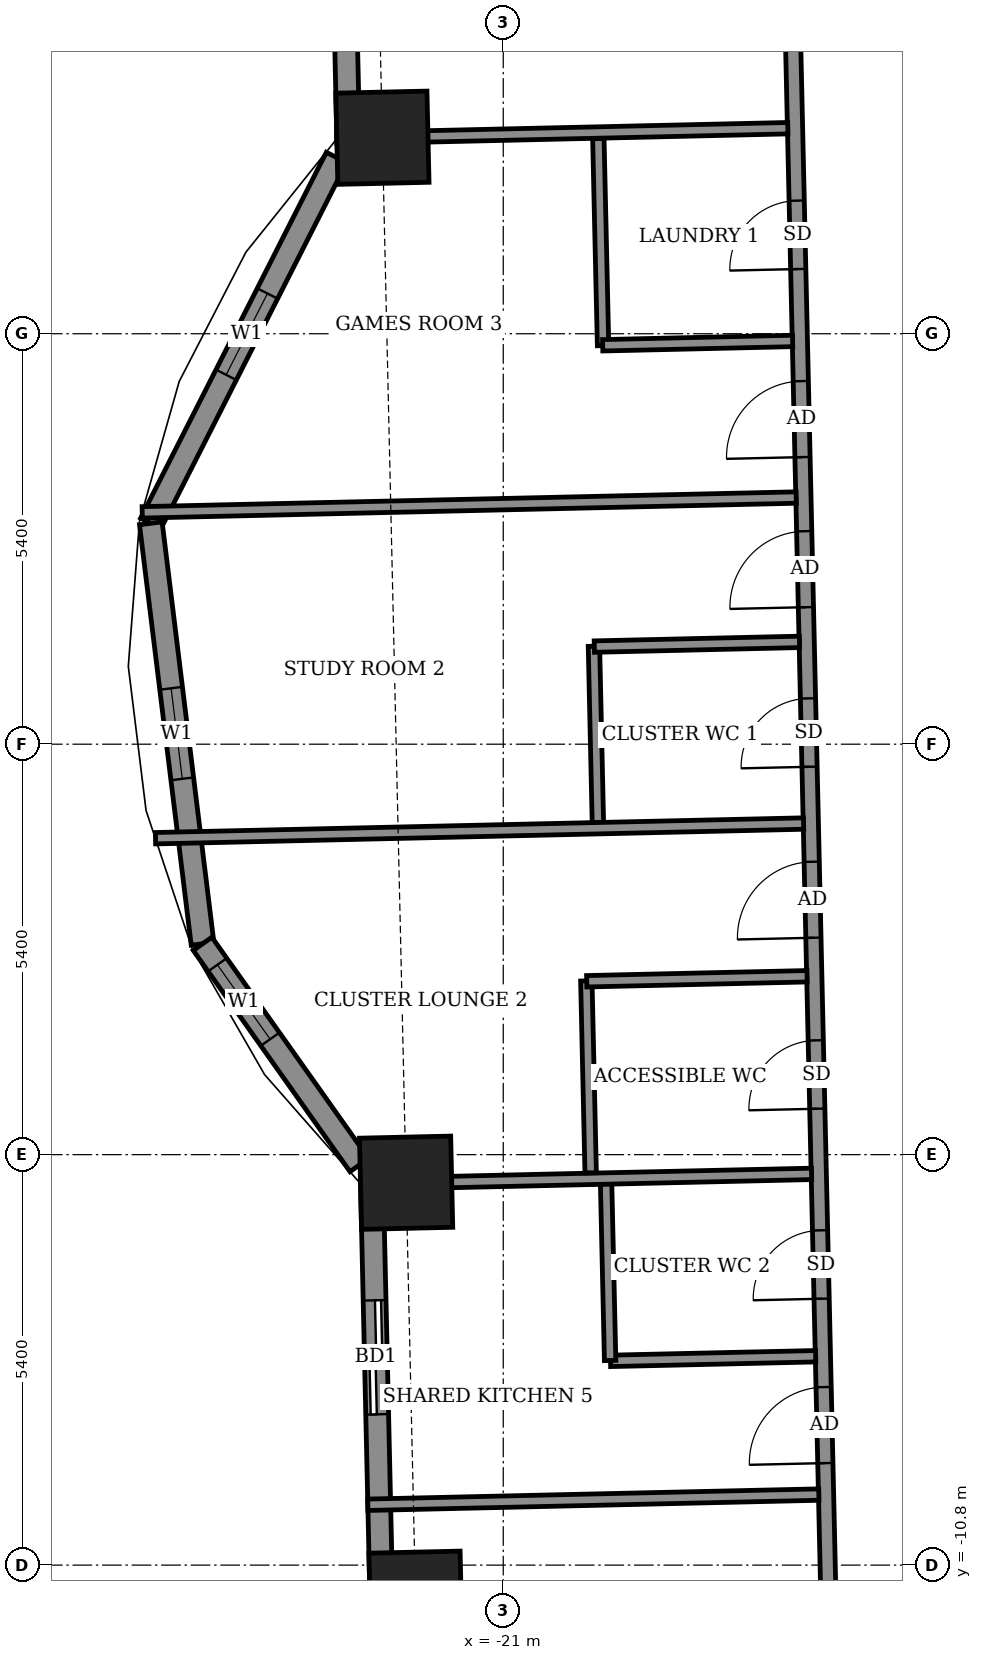
"""IFC4 building model, lengths in metres.
Left out: names, types, materials, properties, quantities, classifications, styles, units other than length and angle.
Written with IfcOpenShell. Run it as: python <this file> out.ifc"""

import sys

from ifc_helpers import new_model, si_unit, direction, frame, frame_2d, origin, origin_2d, place, context, subcontext, project, spatial, rectangle, extrude, element, fill, save


model = new_model("IFC4")
c1 = context("Model", 3, precision=1e-05, world=origin(), true_north=direction((0.0, 1.0)))
c2 = subcontext(c1, "Body", "Model", "MODEL_VIEW")
j1 = project(units=[si_unit("LENGTHUNIT", "METRE"), si_unit("PLANEANGLEUNIT", "RADIAN")], contexts=[c1])
p1 = place(None, origin())
s1 = spatial("IfcSite", under=j1, at=p1, CompositionType="ELEMENT")
p2 = place(p1, origin())
s2 = spatial("IfcBuilding", under=s1, at=p2, CompositionType="ELEMENT")
p3 = place(p2, frame((0.0, 0.0, 186.1)))
s3 = spatial("IfcBuildingStorey", under=s2, at=p3, CompositionType="ELEMENT", Elevation=186.1)
for number, where, z_axis, x_axis in (
    (1, (-22.278, -5.769, -0.55), (0.0, 0.0, 1.0), (0.023, -1.0, 0.0)),
    (2, (-22.154, -11.229, -0.55), (0.0, 0.0, 1.0), (0.023, -1.0, 0.0)),
    (3, (-22.59, 7.979, -0.55), (0.0, 0.0, 1.0), (0.023, -1.0, 0.0)),
):
    element("IfcColumn", number, at=place(p3, frame(where, z_axis=z_axis, x_axis=x_axis)), inside=s3, PredefinedType="COLUMN", context=c2, shape_type="SweptSolid", body=[
        extrude(rectangle(XDim=1.2, YDim=1.2, at=origin_2d()), origin(), (0.0, 0.0, 1.0), 3.6),
    ])
p4 = place(p3, frame((-23.275, 18.34, 0.0), z_axis=(0.0, 0.0, 1.0), x_axis=(0.022705985163, -0.999742185885, 0.0)))
e4 = element("IfcWall", 4, at=p4, inside=s3, PredefinedType="SOLIDWALL", context=c2, shape_type="SweptSolid", body=[
    extrude(rectangle(XDim=10.43, YDim=0.3, at=frame_2d((5.215, 0.0))), origin(), (0.0, 0.0, 1.0), 3.05),
])
p5 = place(p4, frame((1.359, 0.0, 0.0)))
e5 = element("IfcOpeningElement", 5, at=p5, cuts=e4, PredefinedType="OPENING", context=c2, shape_type="SweptSolid", body=[
    extrude(rectangle(XDim=1.5, YDim=2.4, at=frame_2d((0.75, 1.2))), frame((0.0, 0.16, 0.0), z_axis=(0.0, -1.0, 0.0), x_axis=(1.0, 0.0, 0.0)), (0.0, 0.0, 1.0), 0.32),
])
p6 = place(p4, frame((6.543, 0.0, 0.9)))
e6 = element("IfcOpeningElement", 6, at=p6, cuts=e4, PredefinedType="OPENING", context=c2, shape_type="SweptSolid", body=[
    extrude(rectangle(XDim=2.4, YDim=1.5, at=frame_2d((1.2, 0.75))), frame((0.0, 0.16, 0.0), z_axis=(0.0, -1.0, 0.0), x_axis=(1.0, 0.0, 0.0)), (0.0, 0.0, 1.0), 0.32),
])
p7 = place(p3, frame((-23.194, 7.719, 0.0), z_axis=(0.0, 0.0, 1.0), x_axis=(-0.452597193435, -0.891715078091, 0.0)))
e7 = element("IfcWall", 7, at=p7, inside=s3, PredefinedType="SOLIDWALL", context=c2, shape_type="SweptSolid", body=[
    extrude(rectangle(XDim=5.397, YDim=0.3, at=frame_2d((2.699, 0.0))), origin(), (0.0, 0.0, 1.0), 3.05),
])
p8 = place(p7, frame((2.007, 0.0, 0.9)))
e8 = element("IfcOpeningElement", 8, at=p8, cuts=e7, PredefinedType="OPENING", context=c2, shape_type="SweptSolid", body=[
    extrude(rectangle(XDim=1.2, YDim=1.5, at=frame_2d((0.6, 0.75))), frame((0.0, 0.16, 0.0), z_axis=(0.0, -1.0, 0.0), x_axis=(1.0, 0.0, 0.0)), (0.0, 0.0, 1.0), 0.32),
])
p9 = place(p3, frame((-25.637, 2.906, 0.0), z_axis=(0.0, 0.0, 1.0), x_axis=(0.122163831021, -0.992509948761, 0.0)))
e9 = element("IfcWall", 9, at=p9, inside=s3, PredefinedType="SOLIDWALL", context=c2, shape_type="SweptSolid", body=[
    extrude(rectangle(XDim=5.574, YDim=0.3, at=frame_2d((2.787, 0.0))), origin(), (0.0, 0.0, 1.0), 3.05),
])
p10 = place(p9, frame((2.187, 0.0, 0.9)))
e10 = element("IfcOpeningElement", 10, at=p10, cuts=e9, PredefinedType="OPENING", context=c2, shape_type="SweptSolid", body=[
    extrude(rectangle(XDim=1.2, YDim=1.5, at=frame_2d((0.6, 0.75))), frame((0.0, 0.16, 0.0), z_axis=(0.0, -1.0, 0.0), x_axis=(1.0, 0.0, 0.0)), (0.0, 0.0, 1.0), 0.32),
])
p11 = place(p3, frame((-24.956, -2.626, 0.0), z_axis=(0.0, 0.0, 1.0), x_axis=(0.578009745555, -0.816029861, 0.0)))
e11 = element("IfcWall", 11, at=p11, inside=s3, PredefinedType="SOLIDWALL", context=c2, shape_type="SweptSolid", body=[
    extrude(rectangle(XDim=3.567, YDim=0.3, at=frame_2d((1.784, 0.0))), origin(), (0.0, 0.0, 1.0), 3.05),
])
p12 = place(p11, frame((0.338, 0.0, 0.9)))
e12 = element("IfcOpeningElement", 12, at=p12, cuts=e11, PredefinedType="OPENING", context=c2, shape_type="SweptSolid", body=[
    extrude(rectangle(XDim=1.2, YDim=1.5, at=frame_2d((0.6, 0.75))), frame((0.0, 0.16, 0.0), z_axis=(0.0, -1.0, 0.0), x_axis=(1.0, 0.0, 0.0)), (0.0, 0.0, 1.0), 0.32),
])
p13 = place(p3, frame((-22.729, -5.725, 0.0), z_axis=(0.0, 0.0, 1.0), x_axis=(0.022726014582, -0.999741730779, 0.0)))
e13 = element("IfcWall", 13, at=p13, inside=s3, PredefinedType="SOLIDWALL", context=c2, shape_type="SweptSolid", body=[
    extrude(rectangle(XDim=10.829, YDim=0.3, at=frame_2d((5.414, 0.0))), origin(), (0.0, 0.0, 1.0), 3.05),
])
p14 = place(p13, frame((1.592, 0.0, 0.0)))
e14 = element("IfcOpeningElement", 14, at=p14, cuts=e13, PredefinedType="OPENING", context=c2, shape_type="SweptSolid", body=[
    extrude(rectangle(XDim=1.5, YDim=2.4, at=frame_2d((0.75, 1.2))), frame((0.0, 0.16, 0.0), z_axis=(0.0, -1.0, 0.0), x_axis=(1.0, 0.0, 0.0)), (0.0, 0.0, 1.0), 0.32),
])
p15 = place(p13, frame((8.05, 0.0, 0.9)))
e15 = element("IfcOpeningElement", 15, at=p15, cuts=e13, PredefinedType="OPENING", context=c2, shape_type="SweptSolid", body=[
    extrude(rectangle(XDim=1.2, YDim=1.5, at=frame_2d((0.6, 0.75))), frame((0.0, 0.16, 0.0), z_axis=(0.0, -1.0, 0.0), x_axis=(1.0, 0.0, 0.0)), (0.0, 0.0, 1.0), 0.32),
])
p16 = place(p3, frame((-25.421, -8.966, 0.0), z_axis=(0.0, 0.0, 1.0), x_axis=(-0.022675106248, 0.999742886725, 0.0)))
e16 = element("IfcWall", 16, at=p16, inside=s3, PredefinedType="USERDEFINED", context=c2, shape_type="SweptSolid", body=[
    extrude(rectangle(XDim=2.875, YDim=0.55, at=frame_2d((1.438, 0.0))), origin(), (0.0, 0.0, 1.0), 0.8),
])
p17 = place(p3, frame((-16.684, -12.919, 0.0), z_axis=(0.0, 0.0, 1.0), x_axis=(-0.022694293906, 0.999742451346, 0.0)))
e17 = element("IfcWall", 17, at=p17, inside=s3, PredefinedType="PARTITIONING", context=c2, shape_type="SweptSolid", body=[
    extrude(rectangle(XDim=28.024, YDim=0.2, at=frame_2d((14.012, 0.0))), origin(), (0.0, 0.0, 1.0), 3.05),
])
p18 = place(p17, frame((22.825, 0.0, 0.0)))
e18 = element("IfcOpeningElement", 18, at=p18, cuts=e17, PredefinedType="OPENING", context=c2, shape_type="SweptSolid", body=[
    extrude(rectangle(XDim=1.0, YDim=2.1, at=frame_2d((0.5, 1.05))), frame((0.0, 0.11, 0.0), z_axis=(0.0, -1.0, 0.0), x_axis=(1.0, 0.0, 0.0)), (0.0, 0.0, 1.0), 0.22),
])
p19 = place(p17, frame((26.374, 0.0, 0.0)))
e19 = element("IfcOpeningElement", 19, at=p19, cuts=e17, PredefinedType="OPENING", context=c2, shape_type="SweptSolid", body=[
    extrude(rectangle(XDim=0.9, YDim=2.1, at=frame_2d((0.45, 1.05))), frame((0.0, 0.11, 0.0), z_axis=(0.0, -1.0, 0.0), x_axis=(1.0, 0.0, 0.0)), (0.0, 0.0, 1.0), 0.22),
])
p20 = place(p17, frame((16.7, 0.0, 0.0)))
e20 = element("IfcOpeningElement", 20, at=p20, cuts=e17, PredefinedType="OPENING", context=c2, shape_type="SweptSolid", body=[
    extrude(rectangle(XDim=1.0, YDim=2.1, at=frame_2d((0.5, 1.05))), frame((0.0, 0.11, 0.0), z_axis=(0.0, -1.0, 0.0), x_axis=(1.0, 0.0, 0.0)), (0.0, 0.0, 1.0), 0.22),
])
p21 = place(p17, frame((19.175, 0.0, 0.0)))
e21 = element("IfcOpeningElement", 21, at=p21, cuts=e17, PredefinedType="OPENING", context=c2, shape_type="SweptSolid", body=[
    extrude(rectangle(XDim=0.9, YDim=2.1, at=frame_2d((0.45, 1.05))), frame((0.0, 0.11, 0.0), z_axis=(0.0, -1.0, 0.0), x_axis=(1.0, 0.0, 0.0)), (0.0, 0.0, 1.0), 0.22),
])
p22 = place(p17, frame((14.725, 0.0, 0.0)))
e22 = element("IfcOpeningElement", 22, at=p22, cuts=e17, PredefinedType="OPENING", context=c2, shape_type="SweptSolid", body=[
    extrude(rectangle(XDim=1.0, YDim=2.1, at=frame_2d((0.5, 1.05))), frame((0.0, 0.11, 0.0), z_axis=(0.0, -1.0, 0.0), x_axis=(1.0, 0.0, 0.0)), (0.0, 0.0, 1.0), 0.22),
])
p23 = place(p17, frame((12.625, 0.0, 0.0)))
e23 = element("IfcOpeningElement", 23, at=p23, cuts=e17, PredefinedType="OPENING", context=c2, shape_type="SweptSolid", body=[
    extrude(rectangle(XDim=0.9, YDim=2.1, at=frame_2d((0.45, 1.05))), frame((0.0, 0.11, 0.0), z_axis=(0.0, -1.0, 0.0), x_axis=(1.0, 0.0, 0.0)), (0.0, 0.0, 1.0), 0.22),
])
p24 = place(p17, frame((10.375, 0.0, 0.0)))
e24 = element("IfcOpeningElement", 24, at=p24, cuts=e17, PredefinedType="OPENING", context=c2, shape_type="SweptSolid", body=[
    extrude(rectangle(XDim=1.0, YDim=2.1, at=frame_2d((0.5, 1.05))), frame((0.0, 0.11, 0.0), z_axis=(0.0, -1.0, 0.0), x_axis=(1.0, 0.0, 0.0)), (0.0, 0.0, 1.0), 0.22),
])
p25 = place(p17, frame((8.125, 0.0, 0.0)))
e25 = element("IfcOpeningElement", 25, at=p25, cuts=e17, PredefinedType="OPENING", context=c2, shape_type="SweptSolid", body=[
    extrude(rectangle(XDim=0.9, YDim=2.1, at=frame_2d((0.45, 1.05))), frame((0.0, 0.11, 0.0), z_axis=(0.0, -1.0, 0.0), x_axis=(1.0, 0.0, 0.0)), (0.0, 0.0, 1.0), 0.22),
])
p26 = place(p17, frame((3.462, 0.0, 0.0)))
e26 = element("IfcOpeningElement", 26, at=p26, cuts=e17, PredefinedType="OPENING", context=c2, shape_type="SweptSolid", body=[
    extrude(rectangle(XDim=1.0, YDim=2.1, at=frame_2d((0.5, 1.05))), frame((0.0, 0.11, 0.0), z_axis=(0.0, -1.0, 0.0), x_axis=(1.0, 0.0, 0.0)), (0.0, 0.0, 1.0), 0.22),
])
p27 = place(p17, frame((5.625, 0.0, 0.0)))
e27 = element("IfcOpeningElement", 27, at=p27, cuts=e17, PredefinedType="OPENING", context=c2, shape_type="SweptSolid", body=[
    extrude(rectangle(XDim=0.9, YDim=2.1, at=frame_2d((0.45, 1.05))), frame((0.0, 0.11, 0.0), z_axis=(0.0, -1.0, 0.0), x_axis=(1.0, 0.0, 0.0)), (0.0, 0.0, 1.0), 0.22),
])
p28 = place(p3, frame((-22.782, -10.006, 0.0), z_axis=(0.0, 0.0, 1.0), x_axis=(0.999745010927, 0.02258125611, 0.0)))
e28 = element("IfcWall", 28, at=p28, inside=s3, PredefinedType="PARTITIONING", context=c2, shape_type="SweptSolid", body=[
    extrude(rectangle(XDim=5.936, YDim=0.15, at=frame_2d((2.968, 0.0))), origin(), (0.0, 0.0, 1.0), 2.55),
])
p29 = place(p3, frame((-19.589, -8.113, 0.0), z_axis=(0.0, 0.0, 1.0), x_axis=(0.999744443191, 0.022606377605, 0.0)))
e29 = element("IfcWall", 29, at=p29, inside=s3, PredefinedType="PARTITIONING", context=c2, shape_type="SweptSolid", body=[
    extrude(rectangle(XDim=2.7, YDim=0.15, at=frame_2d((1.35, 0.0))), origin(), (0.0, 0.0, 1.0), 3.05),
])
p30 = place(p3, frame((-19.594, -8.108, 0.0), z_axis=(0.0, 0.0, 1.0), x_axis=(-0.02279059109, 0.999740260747, 0.0)))
e30 = element("IfcWall", 30, at=p30, inside=s3, PredefinedType="PARTITIONING", context=c2, shape_type="SweptSolid", body=[
    extrude(rectangle(XDim=2.324, YDim=0.15, at=frame_2d((1.162, 0.0))), origin(), (0.0, 0.0, 1.0), 3.05),
])
p31 = place(p3, frame((-22.578, -5.78, 0.0), z_axis=(0.0, 0.0, 1.0), x_axis=(0.999746200787, 0.022528515532, 0.0)))
e31 = element("IfcWall", 31, at=p31, inside=s3, PredefinedType="PARTITIONING", context=c2, shape_type="SweptSolid", body=[
    extrude(rectangle(XDim=5.635, YDim=0.15, at=frame_2d((2.818, 0.0))), origin(), (0.0, 0.0, 1.0), 3.05),
])
p32 = place(p3, frame((-19.85, -5.639, 0.0), z_axis=(0.0, 0.0, 1.0), x_axis=(-0.022523775833, 0.999746307581, 0.0)))
e32 = element("IfcWall", 32, at=p32, inside=s3, PredefinedType="PARTITIONING", context=c2, shape_type="SweptSolid", body=[
    extrude(rectangle(XDim=2.526, YDim=0.15, at=frame_2d((1.263, 0.0))), origin(), (0.0, 0.0, 1.0), 3.05),
])
p33 = place(p3, frame((-19.902, -3.119, 0.0), z_axis=(0.0, 0.0, 1.0), x_axis=(0.999741618182, 0.022730967319, 0.0)))
e33 = element("IfcWall", 33, at=p33, inside=s3, PredefinedType="PARTITIONING", context=c2, shape_type="SweptSolid", body=[
    extrude(rectangle(XDim=2.9, YDim=0.15, at=frame_2d((1.45, 0.0))), origin(), (0.0, 0.0, 1.0), 3.05),
])
p34 = place(p3, frame((-19.755, -1.035, 0.0), z_axis=(0.0, 0.0, 1.0), x_axis=(-0.022370700241, 0.999749744571, 0.0)))
e34 = element("IfcWall", 34, at=p34, inside=s3, PredefinedType="PARTITIONING", context=c2, shape_type="SweptSolid", body=[
    extrude(rectangle(XDim=2.324, YDim=0.15, at=frame_2d((1.162, 0.0))), origin(), (0.0, 0.0, 1.0), 3.05),
])
p35 = place(p3, frame((-25.575, -1.237, 0.0), z_axis=(0.0, 0.0, 1.0), x_axis=(0.999743576582, 0.022644670096, 0.0)))
e35 = element("IfcWall", 35, at=p35, inside=s3, PredefinedType="PARTITIONING", context=c2, shape_type="SweptSolid", body=[
    extrude(rectangle(XDim=8.528, YDim=0.15, at=frame_2d((4.264, 0.0))), origin(), (0.0, 0.0, 1.0), 2.05),
])
p36 = place(p3, frame((-19.802, 1.284, 0.0), z_axis=(0.0, 0.0, 1.0), x_axis=(0.999736155505, 0.022969966847, 0.0)))
e36 = element("IfcWall", 36, at=p36, inside=s3, PredefinedType="PARTITIONING", context=c2, shape_type="SweptSolid", body=[
    extrude(rectangle(XDim=2.7, YDim=0.15, at=frame_2d((1.35, 0.0))), origin(), (0.0, 0.0, 1.0), 3.05),
])
p37 = place(p3, frame((-25.75, 3.05, 0.0), z_axis=(0.0, 0.0, 1.0), x_axis=(0.999743093505, 0.022665987507, 0.0)))
e37 = element("IfcWall", 37, at=p37, inside=s3, PredefinedType="PARTITIONING", context=c2, shape_type="SweptSolid", body=[
    extrude(rectangle(XDim=8.606, YDim=0.15, at=frame_2d((4.303, 0.0))), origin(), (0.0, 0.0, 1.0), 2.05),
])
p38 = place(p3, frame((-19.687, 5.243, 0.0), z_axis=(0.0, 0.0, 1.0), x_axis=(-0.022758040381, 0.999741002259, 0.0)))
e38 = element("IfcWall", 38, at=p38, inside=s3, PredefinedType="PARTITIONING", context=c2, shape_type="SweptSolid", body=[
    extrude(rectangle(XDim=2.725, YDim=0.15, at=frame_2d((1.362, 0.0))), origin(), (0.0, 0.0, 1.0), 3.05),
])
p39 = place(p3, frame((-19.692, 5.248, 0.0), z_axis=(0.0, 0.0, 1.0), x_axis=(0.999740977561, 0.022759125332, 0.0)))
e39 = element("IfcWall", 39, at=p39, inside=s3, PredefinedType="PARTITIONING", context=c2, shape_type="SweptSolid", body=[
    extrude(rectangle(XDim=2.5, YDim=0.15, at=frame_2d((1.25, 0.0))), origin(), (0.0, 0.0, 1.0), 3.05),
])
p40 = place(p3, frame((-23.19, 7.969, 0.0), z_axis=(0.0, 0.0, 1.0), x_axis=(0.999741261868, 0.022746633113, 0.0)))
e40 = element("IfcWall", 40, at=p40, inside=s3, PredefinedType="PARTITIONING", context=c2, shape_type="SweptSolid", body=[
    extrude(rectangle(XDim=5.935, YDim=0.15, at=frame_2d((2.968, 0.0))), origin(), (0.0, 0.0, 1.0), 3.05),
])
p41 = place(p8, origin())
e41 = element("IfcWindow", 41, at=p41, inside=s3, PartitioningType="SINGLE_PANEL", PredefinedType="WINDOW", context=c2, shape_type="SweptSolid", body=[
    extrude(rectangle(XDim=1.2, YDim=1.5, at=frame_2d((0.6, 0.75))), frame((0.0, 0.03, 0.0), z_axis=(0.0, -1.0, 0.0), x_axis=(1.0, 0.0, 0.0)), (0.0, 0.0, 1.0), 0.06),
])
fill(e8, e41)
p42 = place(p10, origin())
e42 = element("IfcWindow", 42, at=p42, inside=s3, PartitioningType="SINGLE_PANEL", PredefinedType="WINDOW", context=c2, shape_type="SweptSolid", body=[
    extrude(rectangle(XDim=1.2, YDim=1.5, at=frame_2d((0.6, 0.75))), frame((0.0, 0.03, 0.0), z_axis=(0.0, -1.0, 0.0), x_axis=(1.0, 0.0, 0.0)), (0.0, 0.0, 1.0), 0.06),
])
fill(e10, e42)
p43 = place(p12, origin())
e43 = element("IfcWindow", 43, at=p43, inside=s3, PartitioningType="SINGLE_PANEL", PredefinedType="WINDOW", context=c2, shape_type="SweptSolid", body=[
    extrude(rectangle(XDim=1.2, YDim=1.5, at=frame_2d((0.6, 0.75))), frame((0.0, 0.03, 0.0), z_axis=(0.0, -1.0, 0.0), x_axis=(1.0, 0.0, 0.0)), (0.0, 0.0, 1.0), 0.06),
])
fill(e12, e43)
p44 = place(p14, origin())
e44 = element("IfcDoor", 44, at=p44, inside=s3, OperationType="SLIDING_TO_LEFT", PredefinedType="DOOR", context=c2, shape_type="SweptSolid", body=[
    extrude(rectangle(XDim=1.5, YDim=2.4, at=frame_2d((0.75, 1.2))), frame((0.0, 0.025, 0.0), z_axis=(0.0, -1.0, 0.0), x_axis=(1.0, 0.0, 0.0)), (0.0, 0.0, 1.0), 0.05),
])
fill(e14, e44)
p45 = place(p20, origin())
e45 = element("IfcDoor", 45, at=p45, inside=s3, OperationType="SINGLE_SWING_LEFT", PredefinedType="DOOR", context=c2, shape_type="SweptSolid", body=[
    extrude(rectangle(XDim=1.0, YDim=2.1, at=frame_2d((0.5, 1.05))), frame((0.0, 0.025, 0.0), z_axis=(0.0, -1.0, 0.0), x_axis=(1.0, 0.0, 0.0)), (0.0, 0.0, 1.0), 0.05),
])
fill(e20, e45)
p46 = place(p21, origin())
e46 = element("IfcDoor", 46, at=p46, inside=s3, OperationType="SINGLE_SWING_LEFT", PredefinedType="DOOR", context=c2, shape_type="SweptSolid", body=[
    extrude(rectangle(XDim=0.9, YDim=2.1, at=frame_2d((0.45, 1.05))), frame((0.0, 0.025, 0.0), z_axis=(0.0, -1.0, 0.0), x_axis=(1.0, 0.0, 0.0)), (0.0, 0.0, 1.0), 0.05),
])
fill(e21, e46)
p47 = place(p22, origin())
e47 = element("IfcDoor", 47, at=p47, inside=s3, OperationType="SINGLE_SWING_RIGHT", PredefinedType="DOOR", context=c2, shape_type="SweptSolid", body=[
    extrude(rectangle(XDim=1.0, YDim=2.1, at=frame_2d((0.5, 1.05))), frame((0.0, 0.025, 0.0), z_axis=(0.0, -1.0, 0.0), x_axis=(1.0, 0.0, 0.0)), (0.0, 0.0, 1.0), 0.05),
])
fill(e22, e47)
p48 = place(p23, origin())
e48 = element("IfcDoor", 48, at=p48, inside=s3, OperationType="SINGLE_SWING_RIGHT", PredefinedType="DOOR", context=c2, shape_type="SweptSolid", body=[
    extrude(rectangle(XDim=0.9, YDim=2.1, at=frame_2d((0.45, 1.05))), frame((0.0, 0.025, 0.0), z_axis=(0.0, -1.0, 0.0), x_axis=(1.0, 0.0, 0.0)), (0.0, 0.0, 1.0), 0.05),
])
fill(e23, e48)
p49 = place(p24, origin())
e49 = element("IfcDoor", 49, at=p49, inside=s3, OperationType="SINGLE_SWING_LEFT", PredefinedType="DOOR", context=c2, shape_type="SweptSolid", body=[
    extrude(rectangle(XDim=1.0, YDim=2.1, at=frame_2d((0.5, 1.05))), frame((0.0, 0.025, 0.0), z_axis=(0.0, -1.0, 0.0), x_axis=(1.0, 0.0, 0.0)), (0.0, 0.0, 1.0), 0.05),
])
fill(e24, e49)
p50 = place(p25, origin())
e50 = element("IfcDoor", 50, at=p50, inside=s3, OperationType="SINGLE_SWING_LEFT", PredefinedType="DOOR", context=c2, shape_type="SweptSolid", body=[
    extrude(rectangle(XDim=0.9, YDim=2.1, at=frame_2d((0.45, 1.05))), frame((0.0, 0.025, 0.0), z_axis=(0.0, -1.0, 0.0), x_axis=(1.0, 0.0, 0.0)), (0.0, 0.0, 1.0), 0.05),
])
fill(e25, e50)
p51 = place(p26, origin())
e51 = element("IfcDoor", 51, at=p51, inside=s3, OperationType="SINGLE_SWING_RIGHT", PredefinedType="DOOR", context=c2, shape_type="SweptSolid", body=[
    extrude(rectangle(XDim=1.0, YDim=2.1, at=frame_2d((0.5, 1.05))), frame((0.0, 0.025, 0.0), z_axis=(0.0, -1.0, 0.0), x_axis=(1.0, 0.0, 0.0)), (0.0, 0.0, 1.0), 0.05),
])
fill(e26, e51)
p52 = place(p27, origin())
e52 = element("IfcDoor", 52, at=p52, inside=s3, OperationType="SINGLE_SWING_RIGHT", PredefinedType="DOOR", context=c2, shape_type="SweptSolid", body=[
    extrude(rectangle(XDim=0.9, YDim=2.1, at=frame_2d((0.45, 1.05))), frame((0.0, 0.025, 0.0), z_axis=(0.0, -1.0, 0.0), x_axis=(1.0, 0.0, 0.0)), (0.0, 0.0, 1.0), 0.05),
])
fill(e27, e52)
save(model, sys.argv[1])
